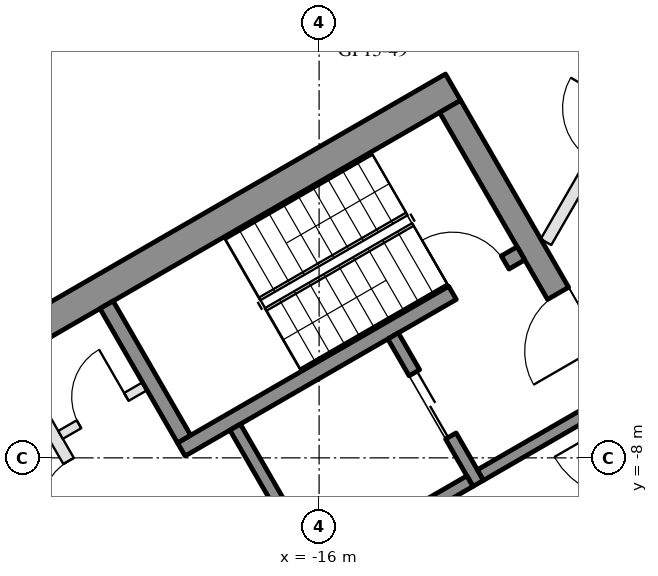
"""IFC4 building model, lengths in metres.
Left out: names, types, materials, properties, quantities, classifications, styles, units other than length and angle.
Written with IfcOpenShell. Run it as: python <this file> out.ifc"""

import sys

from ifc_helpers import new_model, si_unit, direction, frame, frame_2d, origin, place, context, subcontext, project, spatial, rectangle, extrude, element, fill, save


model = new_model("IFC4")
c1 = context("Model", 3, precision=1e-05, world=origin(), true_north=direction((0.0, 1.0)))
c2 = subcontext(c1, "Body", "Model", "MODEL_VIEW")
j1 = project(units=[si_unit("LENGTHUNIT", "METRE"), si_unit("PLANEANGLEUNIT", "RADIAN")], contexts=[c1])
p1 = place(None, origin())
s1 = spatial("IfcSite", under=j1, at=p1, CompositionType="ELEMENT")
p2 = place(p1, origin())
s2 = spatial("IfcBuilding", under=s1, at=p2, CompositionType="ELEMENT")
p3 = place(p2, frame((0.0, 0.0, 157.7)))
s3 = spatial("IfcBuildingStorey", under=s2, at=p3, CompositionType="ELEMENT", Elevation=157.7)
p4 = place(p3, frame((-20.309, 1.934, 0.0), z_axis=(0.0, 0.0, 1.0), x_axis=(-0.499992114976, -0.866029956157, 0.0)))
e1 = element("IfcWall", 1, at=p4, inside=s3, PredefinedType="SOLIDWALL", context=c2, shape_type="SweptSolid", body=[
    extrude(rectangle(XDim=6.74, YDim=0.35, at=frame_2d((3.37, 0.0))), origin(), (0.0, 0.0, 1.0), 3.55),
])
p5 = place(p4, frame((0.77, 0.0, 0.0)))
e2 = element("IfcOpeningElement", 2, at=p5, cuts=e1, PredefinedType="OPENING", context=c2, shape_type="SweptSolid", body=[
    extrude(rectangle(XDim=2.4, YDim=2.4, at=frame_2d((1.2, 1.2))), frame((0.0, 0.185, 0.0), z_axis=(0.0, -1.0, 0.0), x_axis=(1.0, 0.0, 0.0)), (0.0, 0.0, 1.0), 0.37),
])
p6 = place(p4, frame((3.47, 0.0, 0.3)))
e3 = element("IfcOpeningElement", 3, at=p6, cuts=e1, PredefinedType="OPENING", context=c2, shape_type="SweptSolid", body=[
    extrude(rectangle(XDim=2.9, YDim=2.65, at=frame_2d((1.45, 1.325))), frame((0.0, 0.185, 0.0), z_axis=(0.0, -1.0, 0.0), x_axis=(1.0, 0.0, 0.0)), (0.0, 0.0, 1.0), 0.37),
])
p7 = place(p3, frame((-13.797, -1.903, 0.0), z_axis=(0.0, 0.0, 1.0), x_axis=(-0.866025009528, -0.500000682871, 0.0)))
e4 = element("IfcWall", 4, at=p7, inside=s3, PredefinedType="SHEAR", context=c2, shape_type="SweptSolid", body=[
    extrude(rectangle(XDim=14.837, YDim=0.5, at=frame_2d((7.418, 0.0))), origin(), (0.0, 0.0, 1.0), 3.5),
])
p8 = place(p3, frame((-13.845, -2.22, 0.0), z_axis=(0.0, 0.0, 1.0), x_axis=(0.500004234368, -0.866022959057, 0.0)))
e5 = element("IfcWall", 5, at=p8, inside=s3, PredefinedType="SHEAR", context=c2, shape_type="SweptSolid", body=[
    extrude(rectangle(XDim=10.0, YDim=0.4, at=frame_2d((5.0, 0.0))), origin(), (0.0, 0.0, 1.0), 3.5),
])
p9 = place(p8, frame((3.55, 0.0, 0.0)))
e6 = element("IfcOpeningElement", 6, at=p9, cuts=e5, PredefinedType="OPENING", context=c2, shape_type="SweptSolid", body=[
    extrude(rectangle(XDim=1.1, YDim=2.1, at=frame_2d((0.55, 1.05))), frame((0.0, 0.21, 0.0), z_axis=(0.0, -1.0, 0.0), x_axis=(1.0, 0.0, 0.0)), (0.0, 0.0, 1.0), 0.42),
])
p10 = place(p8, frame((5.85, 0.0, 0.0)))
e7 = element("IfcOpeningElement", 7, at=p10, cuts=e5, PredefinedType="OPENING", context=c2, shape_type="SweptSolid", body=[
    extrude(rectangle(XDim=1.4, YDim=2.1, at=frame_2d((0.7, 1.05))), frame((0.0, 0.21, 0.0), z_axis=(0.0, -1.0, 0.0), x_axis=(1.0, 0.0, 0.0)), (0.0, 0.0, 1.0), 0.42),
])
p11 = place(p3, frame((-12.681, -4.636, 0.0), z_axis=(0.0, 0.0, 1.0), x_axis=(-0.866021702275, -0.500006411147, 0.0)))
e8 = element("IfcWall", 8, at=p11, inside=s3, PredefinedType="SHEAR", context=c2, shape_type="SweptSolid", body=[
    extrude(rectangle(XDim=6.45, YDim=0.25, at=frame_2d((3.225, 0.0))), origin(), (0.0, 0.0, 1.0), 3.5),
])
p12 = place(p11, frame((0.3, 0.0, 0.0)))
e9 = element("IfcOpeningElement", 9, at=p12, cuts=e8, PredefinedType="OPENING", context=c2, shape_type="SweptSolid", body=[
    extrude(rectangle(XDim=1.0, YDim=2.1, at=frame_2d((0.5, 1.05))), frame((0.0, 0.135, 0.0), z_axis=(0.0, -1.0, 0.0), x_axis=(1.0, 0.0, 0.0)), (0.0, 0.0, 1.0), 0.27),
])
p13 = place(p3, frame((-19.496, -5.482, 0.0), z_axis=(0.0, 0.0, 1.0), x_axis=(0.499990435942, -0.866030925526, 0.0)))
e10 = element("IfcWall", 10, at=p13, inside=s3, PredefinedType="SHEAR", context=c2, shape_type="SweptSolid", body=[
    extrude(rectangle(XDim=2.55, YDim=0.25, at=frame_2d((1.275, 0.0))), origin(), (0.0, 0.0, 1.0), 3.5),
])
p14 = place(p3, frame((-17.381, -7.495, 0.0), z_axis=(0.0, 0.0, 1.0), x_axis=(0.500011755427, -0.866018616679, 0.0)))
e11 = element("IfcWall", 11, at=p14, inside=s3, PredefinedType="SHEAR", context=c2, shape_type="SweptSolid", body=[
    extrude(rectangle(XDim=2.8, YDim=0.2, at=frame_2d((1.4, 0.0))), origin(), (0.0, 0.0, 1.0), 3.5),
])
p15 = place(p3, frame((-14.783, -5.995, 0.0), z_axis=(0.0, 0.0, 1.0), x_axis=(0.49994636267, -0.866056369097, 0.0)))
e12 = element("IfcWall", 12, at=p15, inside=s3, PredefinedType="SHEAR", context=c2, shape_type="SweptSolid", body=[
    extrude(rectangle(XDim=2.8, YDim=0.2, at=frame_2d((1.4, 0.0))), origin(), (0.0, 0.0, 1.0), 3.5),
])
p16 = place(p15, frame((0.7, 0.0, 0.0)))
e13 = element("IfcOpeningElement", 13, at=p16, cuts=e12, PredefinedType="OPENING", context=c2, shape_type="SweptSolid", body=[
    extrude(rectangle(XDim=1.2, YDim=2.1, at=frame_2d((0.6, 1.05))), frame((0.0, 0.11, 0.0), z_axis=(0.0, -1.0, 0.0), x_axis=(1.0, 0.0, 0.0)), (0.0, 0.0, 1.0), 0.22),
])
p17 = place(p3, frame((-13.52, -8.383, 0.0), z_axis=(0.0, 0.0, 1.0), x_axis=(-0.866034573852, -0.49998411664, 0.0)))
e14 = element("IfcWall", 14, at=p17, inside=s3, PredefinedType="SHEAR", context=c2, shape_type="SweptSolid", body=[
    extrude(rectangle(XDim=2.8, YDim=0.2, at=frame_2d((1.4, 0.0))), origin(), (0.0, 0.0, 1.0), 3.5),
])
p18 = place(p3, frame((-11.268, -7.083, 0.0), z_axis=(0.0, 0.0, 1.0), x_axis=(-0.866050077142, -0.499957262057, 0.0)))
e15 = element("IfcWall", 15, at=p18, inside=s3, PredefinedType="SHEAR", context=c2, shape_type="SweptSolid", body=[
    extrude(rectangle(XDim=2.4, YDim=0.2, at=frame_2d((1.2, 0.0))), origin(), (0.0, 0.0, 1.0), 3.5),
])
p19 = place(p3, frame((-21.076, -6.395, 0.0), z_axis=(0.0, 0.0, 1.0), x_axis=(0.50001468107, -0.866016927499, 0.0)))
e16 = element("IfcWall", 16, at=p19, inside=s3, PredefinedType="PARTITIONING", context=c2, shape_type="SweptSolid", body=[
    extrude(rectangle(XDim=5.4, YDim=0.2, at=frame_2d((2.7, 0.0))), origin(), (0.0, 0.0, 1.0), 3.5),
])
p20 = place(p19, frame((1.913, 0.0, 0.0)))
e17 = element("IfcOpeningElement", 17, at=p20, cuts=e16, PredefinedType="OPENING", context=c2, shape_type="SweptSolid", body=[
    extrude(rectangle(XDim=0.9, YDim=2.1, at=frame_2d((0.45, 1.05))), frame((0.0, 0.11, 0.0), z_axis=(0.0, -1.0, 0.0), x_axis=(1.0, 0.0, 0.0)), (0.0, 0.0, 1.0), 0.22),
])
p21 = place(p19, frame((3.788, 0.0, 0.0)))
e18 = element("IfcOpeningElement", 18, at=p21, cuts=e16, PredefinedType="OPENING", context=c2, shape_type="SweptSolid", body=[
    extrude(rectangle(XDim=0.9, YDim=2.1, at=frame_2d((0.45, 1.05))), frame((0.0, 0.11, 0.0), z_axis=(0.0, -1.0, 0.0), x_axis=(1.0, 0.0, 0.0)), (0.0, 0.0, 1.0), 0.22),
])
p22 = place(p3, frame((-18.866, -6.822, 0.0), z_axis=(0.0, 0.0, 1.0), x_axis=(-0.866028054938, -0.499995408039, 0.0)))
e19 = element("IfcWall", 19, at=p22, inside=s3, PredefinedType="PARTITIONING", context=c2, shape_type="SweptSolid", body=[
    extrude(rectangle(XDim=1.6, YDim=0.15, at=frame_2d((0.8, 0.0))), origin(), (0.0, 0.0, 1.0), 3.5),
])
p23 = place(p22, frame((0.35, 0.0, 0.0)))
e20 = element("IfcOpeningElement", 20, at=p23, cuts=e19, PredefinedType="OPENING", context=c2, shape_type="SweptSolid", body=[
    extrude(rectangle(XDim=0.9, YDim=2.1, at=frame_2d((0.45, 1.05))), frame((0.0, 0.085, 0.0), z_axis=(0.0, -1.0, 0.0), x_axis=(1.0, 0.0, 0.0)), (0.0, 0.0, 1.0), 0.17),
])
p24 = place(p3, frame((-12.269, -4.45, 0.0), z_axis=(0.0, 0.0, 1.0), x_axis=(0.500011931275, 0.86601851515, 0.0)))
e21 = element("IfcWall", 21, at=p24, inside=s3, PredefinedType="PARTITIONING", context=c2, shape_type="SweptSolid", body=[
    extrude(rectangle(XDim=4.088, YDim=0.2, at=frame_2d((2.044, 0.0))), origin(), (0.0, 0.0, 1.0), 2.95),
])
p25 = place(p24, frame((1.544, 0.0, 0.0)))
e22 = element("IfcOpeningElement", 22, at=p25, cuts=e21, PredefinedType="OPENING", context=c2, shape_type="SweptSolid", body=[
    extrude(rectangle(XDim=1.0, YDim=2.1, at=frame_2d((0.5, 1.05))), frame((0.0, 0.11, 0.0), z_axis=(0.0, -1.0, 0.0), x_axis=(1.0, 0.0, 0.0)), (0.0, 0.0, 1.0), 0.22),
])
p26 = place(p16, origin())
e23 = element("IfcDoor", 23, at=p26, inside=s3, OperationType="DOUBLE_DOOR_SLIDING", PredefinedType="DOOR", context=c2, shape_type="SweptSolid", body=[
    extrude(rectangle(XDim=1.2, YDim=2.1, at=frame_2d((0.6, 1.05))), frame((0.0, 0.025, 0.0), z_axis=(0.0, -1.0, 0.0), x_axis=(1.0, 0.0, 0.0)), (0.0, 0.0, 1.0), 0.05),
])
fill(e13, e23)
p27 = place(p23, frame((0.9, 0.0, 0.0), z_axis=(0.0, 0.0, 1.0), x_axis=(-1.0, 0.0, 0.0)))
e24 = element("IfcDoor", 24, at=p27, inside=s3, OperationType="SINGLE_SWING_RIGHT", PredefinedType="DOOR", context=c2, shape_type="SweptSolid", body=[
    extrude(rectangle(XDim=0.9, YDim=2.1, at=frame_2d((0.45, 1.05))), frame((0.0, 0.025, 0.0), z_axis=(0.0, -1.0, 0.0), x_axis=(1.0, 0.0, 0.0)), (0.0, 0.0, 1.0), 0.05),
])
fill(e20, e24)
p28 = place(p20, frame((0.9, 0.0, 0.0), z_axis=(0.0, 0.0, 1.0), x_axis=(-1.0, 0.0, 0.0)))
e25 = element("IfcDoor", 25, at=p28, inside=s3, OperationType="SINGLE_SWING_LEFT", PredefinedType="DOOR", context=c2, shape_type="SweptSolid", body=[
    extrude(rectangle(XDim=0.9, YDim=2.1, at=frame_2d((0.45, 1.05))), frame((0.0, 0.025, 0.0), z_axis=(0.0, -1.0, 0.0), x_axis=(1.0, 0.0, 0.0)), (0.0, 0.0, 1.0), 0.05),
])
fill(e17, e25)
p29 = place(p9, frame((1.1, 0.0, 0.0), z_axis=(0.0, 0.0, 1.0), x_axis=(-1.0, 0.0, 0.0)))
e26 = element("IfcDoor", 26, at=p29, inside=s3, OperationType="SINGLE_SWING_LEFT", PredefinedType="DOOR", context=c2, shape_type="SweptSolid", body=[
    extrude(rectangle(XDim=1.1, YDim=2.1, at=frame_2d((0.55, 1.05))), frame((0.0, 0.025, 0.0), z_axis=(0.0, -1.0, 0.0), x_axis=(1.0, 0.0, 0.0)), (0.0, 0.0, 1.0), 0.05),
])
fill(e6, e26)
p30 = place(p12, frame((1.0, 0.0, 0.0), z_axis=(0.0, 0.0, 1.0), x_axis=(-1.0, 0.0, 0.0)))
e27 = element("IfcDoor", 27, at=p30, inside=s3, OperationType="SINGLE_SWING_LEFT", PredefinedType="DOOR", context=c2, shape_type="SweptSolid", body=[
    extrude(rectangle(XDim=1.0, YDim=2.1, at=frame_2d((0.5, 1.05))), frame((0.0, 0.025, 0.0), z_axis=(0.0, -1.0, 0.0), x_axis=(1.0, 0.0, 0.0)), (0.0, 0.0, 1.0), 0.05),
])
fill(e9, e27)
save(model, sys.argv[1])
